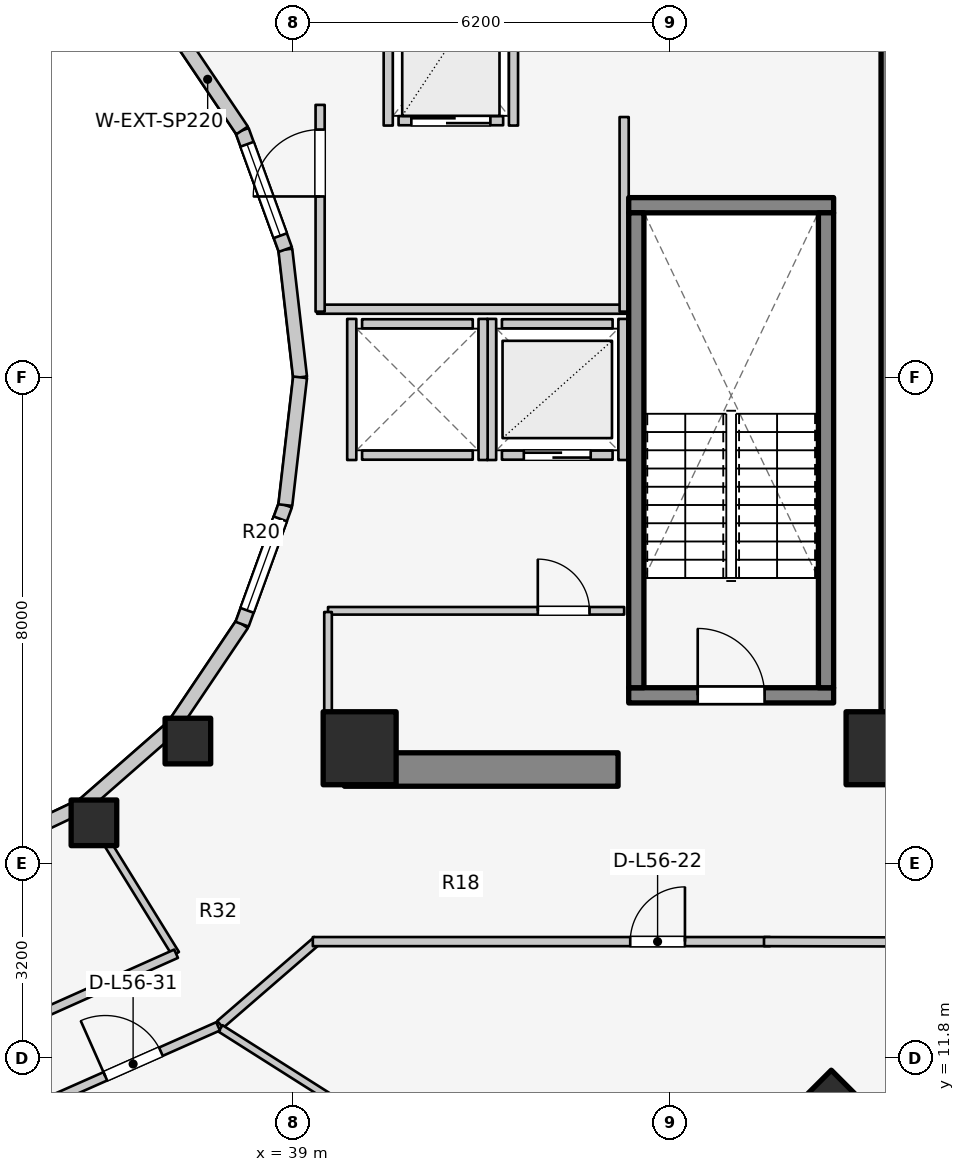
"""IFC4 building model, lengths in metres.
Left out: names, types, materials, properties, quantities, classifications, styles, units other than length and angle.
Written with IfcOpenShell. Run it as: python <this file> out.ifc"""

import sys

from ifc_helpers import new_model, si_unit, direction, frame, frame_2d, origin, origin_2d, place, context, subcontext, project, spatial, rectangle, extrude, element, fill, save


model = new_model("IFC4")
c1 = context("Model", 3, precision=1e-05, world=origin(), true_north=direction((0.0, 1.0)))
c2 = subcontext(c1, "Body", "Model", "MODEL_VIEW")
j1 = project(units=[si_unit("LENGTHUNIT", "METRE"), si_unit("PLANEANGLEUNIT", "RADIAN")], contexts=[c1])
p1 = place(None, origin())
s1 = spatial("IfcSite", under=j1, at=p1, CompositionType="ELEMENT")
p2 = place(p1, origin())
s2 = spatial("IfcBuilding", under=s1, at=p2, CompositionType="ELEMENT")
p3 = place(p2, frame((0.0, 0.0, 183.9)))
s3 = spatial("IfcBuildingStorey", under=s2, at=p3, CompositionType="ELEMENT", Elevation=183.9)
p4 = place(p3, frame((48.95, 17.05, 0.0), z_axis=(0.0, 0.0, 1.0), x_axis=(0.0, 1.0, 0.0)))
e1 = element("IfcWall", 1, at=p4, inside=s3, PredefinedType="SHEAR", context=c2, shape_type="SweptSolid", body=[
    extrude(rectangle(XDim=12.8, YDim=0.55, at=frame_2d((6.4, 0.0))), origin(), (0.0, 0.0, 1.0), 3.1),
])
p5 = place(p3, frame((39.85, 16.55, 0.0), z_axis=(0.0, 0.0, 1.0), x_axis=(1.0, 0.0, 0.0)))
e2 = element("IfcWall", 2, at=p5, inside=s3, PredefinedType="SHEAR", context=c2, shape_type="SweptSolid", body=[
    extrude(rectangle(XDim=4.5, YDim=0.55, at=frame_2d((2.25, 0.0))), origin(), (0.0, 0.0, 1.0), 3.1),
])
p6 = place(p3, frame((44.525, 17.77, 0.0), z_axis=(0.0, 0.0, 1.0), x_axis=(1.0, 0.0, 0.0)))
e3 = element("IfcWall", 3, at=p6, inside=s3, PredefinedType="SOLIDWALL", context=c2, shape_type="SweptSolid", body=[
    extrude(rectangle(XDim=3.37, YDim=0.25, at=frame_2d((1.685, 0.0))), origin(), (0.0, 0.0, 1.0), 3.1),
])
p7 = place(p6, frame((1.135, 0.0, 0.0)))
e4 = element("IfcOpeningElement", 4, at=p7, cuts=e3, PredefinedType="OPENING", context=c2, shape_type="SweptSolid", body=[
    extrude(rectangle(XDim=1.1, YDim=2.1, at=frame_2d((0.55, 1.05))), frame((0.0, 0.135, 0.0), z_axis=(0.0, -1.0, 0.0), x_axis=(1.0, 0.0, 0.0)), (0.0, 0.0, 1.0), 0.27),
])
p8 = place(p3, frame((44.525, 25.83, 0.0), z_axis=(0.0, 0.0, 1.0), x_axis=(1.0, 0.0, 0.0)))
e5 = element("IfcWall", 5, at=p8, inside=s3, PredefinedType="SOLIDWALL", context=c2, shape_type="SweptSolid", body=[
    extrude(rectangle(XDim=3.37, YDim=0.25, at=frame_2d((1.685, 0.0))), origin(), (0.0, 0.0, 1.0), 3.1),
])
for number, where, z_axis, x_axis in (
    (6, (44.65, 17.895, 0.0), (0.0, 0.0, 1.0), (0.0, 1.0, 0.0)),
    (7, (47.77, 17.895, 0.0), (0.0, 0.0, 1.0), (0.0, 1.0, 0.0)),
):
    element("IfcWall", number, at=place(p3, frame(where, z_axis=z_axis, x_axis=x_axis)), inside=s3, PredefinedType="SOLIDWALL", context=c2, shape_type="SweptSolid", body=[
        extrude(rectangle(XDim=7.81, YDim=0.25, at=frame_2d((3.905, 0.0))), origin(), (0.0, 0.0, 1.0), 3.1),
    ])
for number, where, z_axis, x_axis in (
    (8, (40.1, 16.9, 0.0), (0.0, 0.0, 1.0), (1.0, 0.0, 0.0)),
    (9, (48.7, 16.9, 0.0), (0.0, 0.0, 1.0), (1.0, 0.0, 0.0)),
):
    element("IfcColumn", number, at=place(p3, frame(where, z_axis=z_axis, x_axis=x_axis)), inside=s3, PredefinedType="COLUMN", context=c2, shape_type="SweptSolid", body=[
        extrude(rectangle(XDim=1.2, YDim=1.2, at=origin_2d()), origin(), (0.0, 0.0, 1.0), 3.1),
    ])
for number, where, z_axis, x_axis in (
    (10, (35.73, 15.673, 0.0), (0.0, 0.0, 1.0), (1.0, 0.0, 0.0)),
    (11, (37.275, 17.018, 0.0), (0.0, 0.0, 1.0), (1.0, 0.0, 0.0)),
):
    element("IfcColumn", number, at=place(p3, frame(where, z_axis=z_axis, x_axis=x_axis)), inside=s3, PredefinedType="COLUMN", context=c2, shape_type="SweptSolid", body=[
        extrude(rectangle(XDim=0.75, YDim=0.75, at=origin_2d()), origin(), (0.0, 0.0, 1.0), 3.1),
    ])
p9 = place(p3, frame((47.857, 10.969, 0.0), z_axis=(0.0, 0.0, 1.0), x_axis=(0.707106781187, -0.707106781187, 0.0)))
e12 = element("IfcColumn", 12, at=p9, inside=s3, PredefinedType="COLUMN", context=c2, shape_type="SweptSolid", body=[
    extrude(rectangle(XDim=0.9, YDim=0.9, at=origin_2d()), origin(), (0.0, 0.0, 1.0), 3.1),
])
p10 = place(p3, frame((39.12, 23.0, 0.0), z_axis=(0.0, 0.0, 1.0), x_axis=(-0.114711713601, 0.993398823617, 0.0)))
e13 = element("IfcWall", 13, at=p10, inside=s3, PredefinedType="STANDARD", context=c2, shape_type="SweptSolid", body=[
    extrude(rectangle(XDim=2.115, YDim=0.23, at=frame_2d((1.058, 0.0))), origin(), (0.0, 0.0, 1.0), 2.84),
])
p11 = place(p3, frame((38.877, 25.102, 0.0), z_axis=(0.0, 0.0, 1.0), x_axis=(-0.341423187295, 0.93990968033, 0.0)))
e14 = element("IfcWall", 14, at=p11, inside=s3, PredefinedType="STANDARD", context=c2, shape_type="SweptSolid", body=[
    extrude(rectangle(XDim=2.084, YDim=0.23, at=frame_2d((1.042, 0.0))), origin(), (0.0, 0.0, 1.0), 2.84),
])
p12 = place(p11, frame((0.242, 0.0, 0.85)))
e15 = element("IfcOpeningElement", 15, at=p12, cuts=e14, PredefinedType="OPENING", context=c2, shape_type="SweptSolid", body=[
    extrude(rectangle(XDim=1.6, YDim=1.65, at=frame_2d((0.8, 0.825))), frame((0.0, 0.125, 0.0), z_axis=(0.0, -1.0, 0.0), x_axis=(1.0, 0.0, 0.0)), (0.0, 0.0, 1.0), 0.25),
])
p13 = place(p3, frame((38.166, 27.06, 0.0), z_axis=(0.0, 0.0, 1.0), x_axis=(-0.558197800898, 0.829707909492, 0.0)))
e16 = element("IfcWall", 16, at=p13, inside=s3, PredefinedType="STANDARD", context=c2, shape_type="SweptSolid", body=[
    extrude(rectangle(XDim=2.027, YDim=0.23, at=frame_2d((1.013, 0.0))), origin(), (0.0, 0.0, 1.0), 2.16),
])
p14 = place(p3, frame((33.843, 15.157, 0.0), z_axis=(0.0, 0.0, 1.0), x_axis=(0.904179699603, 0.427152280606, 0.0)))
e17 = element("IfcWall", 17, at=p14, inside=s3, PredefinedType="STANDARD", context=c2, shape_type="SweptSolid", body=[
    extrude(rectangle(XDim=1.899, YDim=0.23, at=frame_2d((0.95, 0.0))), origin(), (0.0, 0.0, 1.0), 2.16),
])
p15 = place(p3, frame((35.56, 15.968, 0.0), z_axis=(0.0, 0.0, 1.0), x_axis=(0.752576694707, 0.658504607869, 0.0)))
e18 = element("IfcWall", 18, at=p15, inside=s3, PredefinedType="STANDARD", context=c2, shape_type="SweptSolid", body=[
    extrude(rectangle(XDim=1.959, YDim=0.23, at=frame_2d((0.98, 0.0))), origin(), (0.0, 0.0, 1.0), 2.16),
])
p16 = place(p3, frame((37.035, 17.258, 0.0), z_axis=(0.0, 0.0, 1.0), x_axis=(0.558197800898, 0.829707909492, 0.0)))
e19 = element("IfcWall", 19, at=p16, inside=s3, PredefinedType="STANDARD", context=c2, shape_type="SweptSolid", body=[
    extrude(rectangle(XDim=2.027, YDim=0.23, at=frame_2d((1.013, 0.0))), origin(), (0.0, 0.0, 1.0), 2.16),
])
p17 = place(p3, frame((38.166, 18.94, 0.0), z_axis=(0.0, 0.0, 1.0), x_axis=(0.341423187295, 0.93990968033, 0.0)))
e20 = element("IfcWall", 20, at=p17, inside=s3, PredefinedType="STANDARD", context=c2, shape_type="SweptSolid", body=[
    extrude(rectangle(XDim=2.084, YDim=0.23, at=frame_2d((1.042, 0.0))), origin(), (0.0, 0.0, 1.0), 2.84),
])
p18 = place(p17, frame((0.242, 0.0, 0.85)))
e21 = element("IfcOpeningElement", 21, at=p18, cuts=e20, PredefinedType="OPENING", context=c2, shape_type="SweptSolid", body=[
    extrude(rectangle(XDim=1.6, YDim=1.65, at=frame_2d((0.8, 0.825))), frame((0.0, 0.125, 0.0), z_axis=(0.0, -1.0, 0.0), x_axis=(1.0, 0.0, 0.0)), (0.0, 0.0, 1.0), 0.25),
])
p19 = place(p3, frame((38.877, 20.898, 0.0), z_axis=(0.0, 0.0, 1.0), x_axis=(0.114711713601, 0.993398823617, 0.0)))
e22 = element("IfcWall", 22, at=p19, inside=s3, PredefinedType="STANDARD", context=c2, shape_type="SweptSolid", body=[
    extrude(rectangle(XDim=2.115, YDim=0.23, at=frame_2d((1.058, 0.0))), origin(), (0.0, 0.0, 1.0), 2.84),
])
p20 = place(p3, frame((48.269, 10.559, 0.0), z_axis=(0.0, 0.0, 1.0), x_axis=(0.727667301037, 0.68593024354, 0.0)))
e23 = element("IfcWall", 23, at=p20, inside=s3, PredefinedType="STANDARD", context=c2, shape_type="SweptSolid", body=[
    extrude(rectangle(XDim=4.604, YDim=0.26, at=frame_2d((2.302, 0.0))), origin(), (0.0, 0.0, 1.0), 2.85),
])
p21 = place(p20, frame((1.552, 0.0, 0.75)))
e24 = element("IfcOpeningElement", 24, at=p21, cuts=e23, PredefinedType="OPENING", context=c2, shape_type="SweptSolid", body=[
    extrude(rectangle(XDim=1.5, YDim=1.6, at=frame_2d((0.75, 0.8))), frame((0.0, 0.14, 0.0), z_axis=(0.0, -1.0, 0.0), x_axis=(1.0, 0.0, 0.0)), (0.0, 0.0, 1.0), 0.28),
])
p22 = place(p3, frame((42.44, 21.72, 0.0), z_axis=(0.0, 0.0, 1.0), x_axis=(1.0, 0.0, 0.0)))
e25 = element("IfcWall", 25, at=p22, inside=s3, PredefinedType="SOLIDWALL", context=c2, shape_type="SweptSolid", body=[
    extrude(rectangle(XDim=1.82, YDim=0.15, at=frame_2d((0.91, 0.0))), origin(), (0.0, 0.0, 1.0), 2.855),
])
p23 = place(p22, frame((0.36, 0.0, 0.0)))
e26 = element("IfcOpeningElement", 26, at=p23, cuts=e25, PredefinedType="OPENING", context=c2, shape_type="SweptSolid", body=[
    extrude(rectangle(XDim=1.1, YDim=2.1, at=frame_2d((0.55, 1.05))), frame((0.0, 0.085, 0.0), z_axis=(0.0, -1.0, 0.0), x_axis=(1.0, 0.0, 0.0)), (0.0, 0.0, 1.0), 0.17),
])
p24 = place(p3, frame((42.44, 23.88, 0.0), z_axis=(0.0, 0.0, 1.0), x_axis=(1.0, 0.0, 0.0)))
e27 = element("IfcWall", 27, at=p24, inside=s3, PredefinedType="SOLIDWALL", context=c2, shape_type="SweptSolid", body=[
    extrude(rectangle(XDim=1.82, YDim=0.15, at=frame_2d((0.91, 0.0))), origin(), (0.0, 0.0, 1.0), 2.855),
])
for number, where, z_axis, x_axis in (
    (28, (42.27, 21.64, 0.0), (0.0, 0.0, 1.0), (0.0, 1.0, 0.0)),
    (29, (44.43, 21.64, 0.0), (0.0, 0.0, 1.0), (0.0, 1.0, 0.0)),
):
    element("IfcWall", number, at=place(p3, frame(where, z_axis=z_axis, x_axis=x_axis)), inside=s3, PredefinedType="SOLIDWALL", context=c2, shape_type="SweptSolid", body=[
        extrude(rectangle(XDim=2.32, YDim=0.15, at=frame_2d((1.16, 0.0))), origin(), (0.0, 0.0, 1.0), 2.855),
    ])
for number, where, z_axis, x_axis in (
    (30, (40.14, 21.72, 0.0), (0.0, 0.0, 1.0), (1.0, 0.0, 0.0)),
    (31, (40.14, 23.88, 0.0), (0.0, 0.0, 1.0), (1.0, 0.0, 0.0)),
):
    element("IfcWall", number, at=place(p3, frame(where, z_axis=z_axis, x_axis=x_axis)), inside=s3, PredefinedType="SOLIDWALL", context=c2, shape_type="SweptSolid", body=[
        extrude(rectangle(XDim=1.82, YDim=0.15, at=frame_2d((0.91, 0.0))), origin(), (0.0, 0.0, 1.0), 2.12),
    ])
p25 = place(p3, frame((39.97, 21.64, 0.0), z_axis=(0.0, 0.0, 1.0), x_axis=(0.0, 1.0, 0.0)))
e32 = element("IfcWall", 32, at=p25, inside=s3, PredefinedType="SOLIDWALL", context=c2, shape_type="SweptSolid", body=[
    extrude(rectangle(XDim=2.32, YDim=0.15, at=frame_2d((1.16, 0.0))), origin(), (0.0, 0.0, 1.0), 2.12),
])
p26 = place(p3, frame((42.13, 21.64, 0.0), z_axis=(0.0, 0.0, 1.0), x_axis=(0.0, 1.0, 0.0)))
e33 = element("IfcWall", 33, at=p26, inside=s3, PredefinedType="SOLIDWALL", context=c2, shape_type="SweptSolid", body=[
    extrude(rectangle(XDim=2.32, YDim=0.15, at=frame_2d((1.16, 0.0))), origin(), (0.0, 0.0, 1.0), 2.855),
])
p27 = place(p3, frame((40.74, 27.22, 0.0), z_axis=(0.0, 0.0, 1.0), x_axis=(1.0, 0.0, 0.0)))
e34 = element("IfcWall", 34, at=p27, inside=s3, PredefinedType="SOLIDWALL", context=c2, shape_type="SweptSolid", body=[
    extrude(rectangle(XDim=1.72, YDim=0.15, at=frame_2d((0.86, 0.0))), origin(), (0.0, 0.0, 1.0), 2.855),
])
p28 = place(p27, frame((0.21, 0.0, 0.0)))
e35 = element("IfcOpeningElement", 35, at=p28, cuts=e34, PredefinedType="OPENING", context=c2, shape_type="SweptSolid", body=[
    extrude(rectangle(XDim=1.3, YDim=2.1, at=frame_2d((0.65, 1.05))), frame((0.0, 0.085, 0.0), z_axis=(0.0, -1.0, 0.0), x_axis=(1.0, 0.0, 0.0)), (0.0, 0.0, 1.0), 0.17),
])
for number, where, z_axis, x_axis in (
    (36, (40.57, 27.14, 0.0), (0.0, 0.0, 1.0), (0.0, 1.0, 0.0)),
    (37, (42.63, 27.14, 0.0), (0.0, 0.0, 1.0), (0.0, 1.0, 0.0)),
):
    element("IfcWall", number, at=place(p3, frame(where, z_axis=z_axis, x_axis=x_axis)), inside=s3, PredefinedType="SOLIDWALL", context=c2, shape_type="SweptSolid", body=[
        extrude(rectangle(XDim=2.72, YDim=0.15, at=frame_2d((1.36, 0.0))), origin(), (0.0, 0.0, 1.0), 2.855),
    ])
p29 = place(p3, frame((39.4, 24.12, 0.0), z_axis=(0.0, 0.0, 1.0), x_axis=(1.0, 0.0, 0.0)))
e38 = element("IfcWall", 38, at=p29, inside=s3, PredefinedType="PARTITIONING", context=c2, shape_type="SweptSolid", body=[
    extrude(rectangle(XDim=5.08, YDim=0.15, at=frame_2d((2.54, 0.0))), origin(), (0.0, 0.0, 1.0), 2.12),
])
p30 = place(p3, frame((44.45, 24.08, 0.0), z_axis=(0.0, 0.0, 1.0), x_axis=(0.0, 1.0, 0.0)))
e39 = element("IfcWall", 39, at=p30, inside=s3, PredefinedType="PARTITIONING", context=c2, shape_type="SweptSolid", body=[
    extrude(rectangle(XDim=3.2, YDim=0.15, at=frame_2d((1.6, 0.0))), origin(), (0.0, 0.0, 1.0), 2.855),
])
p31 = place(p3, frame((39.45, 24.08, 0.0), z_axis=(0.0, 0.0, 1.0), x_axis=(0.0, 1.0, 0.0)))
e40 = element("IfcWall", 40, at=p31, inside=s3, PredefinedType="PARTITIONING", context=c2, shape_type="SweptSolid", body=[
    extrude(rectangle(XDim=3.4, YDim=0.15, at=frame_2d((1.7, 0.0))), origin(), (0.0, 0.0, 1.0), 2.855),
])
p32 = place(p31, frame((1.894, 0.0, 0.0)))
e41 = element("IfcOpeningElement", 41, at=p32, cuts=e40, PredefinedType="OPENING", context=c2, shape_type="SweptSolid", body=[
    extrude(rectangle(XDim=1.1, YDim=2.1, at=frame_2d((0.55, 1.05))), frame((0.0, 0.085, 0.0), z_axis=(0.0, -1.0, 0.0), x_axis=(1.0, 0.0, 0.0)), (0.0, 0.0, 1.0), 0.17),
])
p33 = place(p3, frame((39.58, 19.16, 0.0), z_axis=(0.0, 0.0, 1.0), x_axis=(1.0, 0.0, 0.0)))
e42 = element("IfcWall", 42, at=p33, inside=s3, PredefinedType="PARTITIONING", context=c2, shape_type="SweptSolid", body=[
    extrude(rectangle(XDim=4.87, YDim=0.125, at=frame_2d((2.435, 0.0))), origin(), (0.0, 0.0, 1.0), 2.12),
])
p34 = place(p33, frame((3.45, 0.0, 0.0)))
e43 = element("IfcOpeningElement", 43, at=p34, cuts=e42, PredefinedType="OPENING", context=c2, shape_type="SweptSolid", body=[
    extrude(rectangle(XDim=0.85, YDim=2.05, at=frame_2d((0.425, 1.025))), frame((0.0, 0.073, 0.0), z_axis=(0.0, -1.0, 0.0), x_axis=(1.0, 0.0, 0.0)), (0.0, 0.0, 1.0), 0.145),
])
p35 = place(p3, frame((39.58, 17.1, 0.0), z_axis=(0.0, 0.0, 1.0), x_axis=(0.0, 1.0, 0.0)))
e44 = element("IfcWall", 44, at=p35, inside=s3, PredefinedType="PARTITIONING", context=c2, shape_type="SweptSolid", body=[
    extrude(rectangle(XDim=2.04, YDim=0.125, at=frame_2d((1.02, 0.0))), origin(), (0.0, 0.0, 1.0), 2.232),
])
p36 = place(p3, frame((37.807, 12.358, 0.0), z_axis=(0.0, 0.0, 1.0), x_axis=(0.756055312247, 0.654507727092, 0.0)))
e45 = element("IfcWall", 45, at=p36, inside=s3, PredefinedType="PARTITIONING", context=c2, shape_type="SweptSolid", body=[
    extrude(rectangle(XDim=2.111, YDim=0.15, at=frame_2d((1.055, 0.0))), origin(), (0.0, 0.0, 1.0), 2.299),
])
p37 = place(p3, frame((39.33, 13.72, 0.0), z_axis=(0.0, 0.0, 1.0), x_axis=(1.0, 0.0, 0.0)))
e46 = element("IfcWall", 46, at=p37, inside=s3, PredefinedType="PARTITIONING", context=c2, shape_type="SweptSolid", body=[
    extrude(rectangle(XDim=7.52, YDim=0.15, at=frame_2d((3.76, 0.0))), origin(), (0.0, 0.0, 1.0), 2.299),
])
p38 = place(p37, frame((5.22, 0.0, 0.0)))
e47 = element("IfcOpeningElement", 47, at=p38, cuts=e46, PredefinedType="OPENING", context=c2, shape_type="SweptSolid", body=[
    extrude(rectangle(XDim=0.9, YDim=2.1, at=frame_2d((0.45, 1.05))), frame((0.0, 0.085, 0.0), z_axis=(0.0, -1.0, 0.0), x_axis=(1.0, 0.0, 0.0)), (0.0, 0.0, 1.0), 0.17),
])
p39 = place(p3, frame((46.75, 13.72, 0.0), z_axis=(0.0, 0.0, 1.0), x_axis=(0.999997122315, -0.00239903348, 0.0)))
e48 = element("IfcWall", 48, at=p39, inside=s3, PredefinedType="PARTITIONING", context=c2, shape_type="SweptSolid", body=[
    extrude(rectangle(XDim=4.885, YDim=0.15, at=frame_2d((2.442, 0.0))), origin(), (0.0, 0.0, 1.0), 2.22),
])
p40 = place(p3, frame((35.55, 15.985, 0.0), z_axis=(0.0, 0.0, 1.0), x_axis=(0.525627246902, -0.850714991824, 0.0)))
e49 = element("IfcWall", 49, at=p40, inside=s3, PredefinedType="PARTITIONING", context=c2, shape_type="SweptSolid", body=[
    extrude(rectangle(XDim=2.901, YDim=0.125, at=frame_2d((1.451, 0.0))), origin(), (0.0, 0.0, 1.0), 2.299),
])
p41 = place(p3, frame((34.625, 12.423, 0.0), z_axis=(0.0, 0.0, 1.0), x_axis=(0.912888568324, 0.408208845842, 0.0)))
e50 = element("IfcWall", 50, at=p41, inside=s3, PredefinedType="PARTITIONING", context=c2, shape_type="SweptSolid", body=[
    extrude(rectangle(XDim=2.69, YDim=0.15, at=frame_2d((1.345, 0.0))), origin(), (0.0, 0.0, 1.0), 2.299),
])
p42 = place(p3, frame((37.812, 12.292, 0.0), z_axis=(0.0, 0.0, 1.0), x_axis=(0.844640430122, -0.535334048799, 0.0)))
e51 = element("IfcWall", 51, at=p42, inside=s3, PredefinedType="PARTITIONING", context=c2, shape_type="SweptSolid", body=[
    extrude(rectangle(XDim=7.188, YDim=0.125, at=frame_2d((3.594, 0.0))), origin(), (0.0, 0.0, 1.0), 2.299),
])
p43 = place(p3, frame((34.976, 11.088, 0.0), z_axis=(0.0, 0.0, 1.0), x_axis=(0.914324470734, 0.404982422108, 0.0)))
e52 = element("IfcWall", 52, at=p43, inside=s3, PredefinedType="PARTITIONING", context=c2, shape_type="SweptSolid", body=[
    extrude(rectangle(XDim=3.058, YDim=0.15, at=frame_2d((1.529, 0.0))), origin(), (0.0, 0.0, 1.0), 2.299),
])
p44 = place(p43, frame((1.029, 0.0, 0.0)))
e53 = element("IfcOpeningElement", 53, at=p44, cuts=e52, PredefinedType="OPENING", context=c2, shape_type="SweptSolid", body=[
    extrude(rectangle(XDim=1.0, YDim=2.1, at=frame_2d((0.5, 1.05))), frame((0.0, 0.085, 0.0), z_axis=(0.0, -1.0, 0.0), x_axis=(1.0, 0.0, 0.0)), (0.0, 0.0, 1.0), 0.17),
])
p45 = place(p12, origin())
e54 = element("IfcWindow", 54, at=p45, inside=s3, PartitioningType="SINGLE_PANEL", PredefinedType="WINDOW", context=c2, shape_type="SweptSolid", body=[
    extrude(rectangle(XDim=1.6, YDim=1.65, at=frame_2d((0.8, 0.825))), frame((0.0, 0.03, 0.0), z_axis=(0.0, -1.0, 0.0), x_axis=(1.0, 0.0, 0.0)), (0.0, 0.0, 1.0), 0.06),
])
fill(e15, e54)
p46 = place(p18, origin())
e55 = element("IfcWindow", 55, at=p46, inside=s3, PartitioningType="SINGLE_PANEL", PredefinedType="WINDOW", context=c2, shape_type="SweptSolid", body=[
    extrude(rectangle(XDim=1.6, YDim=1.65, at=frame_2d((0.8, 0.825))), frame((0.0, 0.03, 0.0), z_axis=(0.0, -1.0, 0.0), x_axis=(1.0, 0.0, 0.0)), (0.0, 0.0, 1.0), 0.06),
])
fill(e21, e55)
p47 = place(p7, origin())
e56 = element("IfcDoor", 56, at=p47, inside=s3, OperationType="SINGLE_SWING_LEFT", PredefinedType="DOOR", context=c2, shape_type="SweptSolid", body=[
    extrude(rectangle(XDim=1.1, YDim=2.1, at=frame_2d((0.55, 1.05))), frame((0.0, 0.025, 0.0), z_axis=(0.0, -1.0, 0.0), x_axis=(1.0, 0.0, 0.0)), (0.0, 0.0, 1.0), 0.05),
])
fill(e4, e56)
p48 = place(p23, origin())
e57 = element("IfcDoor", 57, at=p48, inside=s3, OperationType="DOUBLE_DOOR_SLIDING", PredefinedType="DOOR", context=c2, shape_type="SweptSolid", body=[
    extrude(rectangle(XDim=1.1, YDim=2.1, at=frame_2d((0.55, 1.05))), frame((0.0, 0.025, 0.0), z_axis=(0.0, -1.0, 0.0), x_axis=(1.0, 0.0, 0.0)), (0.0, 0.0, 1.0), 0.05),
])
fill(e26, e57)
p49 = place(p28, origin())
e58 = element("IfcDoor", 58, at=p49, inside=s3, OperationType="DOUBLE_DOOR_SLIDING", PredefinedType="DOOR", context=c2, shape_type="SweptSolid", body=[
    extrude(rectangle(XDim=1.3, YDim=2.1, at=frame_2d((0.65, 1.05))), frame((0.0, 0.025, 0.0), z_axis=(0.0, -1.0, 0.0), x_axis=(1.0, 0.0, 0.0)), (0.0, 0.0, 1.0), 0.05),
])
fill(e35, e58)
p50 = place(p32, origin())
e59 = element("IfcDoor", 59, at=p50, inside=s3, OperationType="SINGLE_SWING_LEFT", PredefinedType="DOOR", context=c2, shape_type="SweptSolid", body=[
    extrude(rectangle(XDim=1.1, YDim=2.1, at=frame_2d((0.55, 1.05))), frame((0.0, 0.025, 0.0), z_axis=(0.0, -1.0, 0.0), x_axis=(1.0, 0.0, 0.0)), (0.0, 0.0, 1.0), 0.05),
])
fill(e41, e59)
p51 = place(p34, origin())
e60 = element("IfcDoor", 60, at=p51, inside=s3, OperationType="SINGLE_SWING_LEFT", PredefinedType="DOOR", context=c2, shape_type="SweptSolid", body=[
    extrude(rectangle(XDim=0.85, YDim=2.05, at=frame_2d((0.425, 1.025))), frame((0.0, 0.025, 0.0), z_axis=(0.0, -1.0, 0.0), x_axis=(1.0, 0.0, 0.0)), (0.0, 0.0, 1.0), 0.05),
])
fill(e43, e60)
p52 = place(p38, origin())
e61 = element("IfcDoor", 61, at=p52, inside=s3, OperationType="SINGLE_SWING_RIGHT", PredefinedType="DOOR", context=c2, shape_type="SweptSolid", body=[
    extrude(rectangle(XDim=0.9, YDim=2.1, at=frame_2d((0.45, 1.05))), frame((0.0, 0.025, 0.0), z_axis=(0.0, -1.0, 0.0), x_axis=(1.0, 0.0, 0.0)), (0.0, 0.0, 1.0), 0.05),
])
fill(e47, e61)
p53 = place(p44, origin())
e62 = element("IfcDoor", 62, at=p53, inside=s3, OperationType="SINGLE_SWING_LEFT", PredefinedType="DOOR", context=c2, shape_type="SweptSolid", body=[
    extrude(rectangle(XDim=1.0, YDim=2.1, at=frame_2d((0.5, 1.05))), frame((0.0, 0.025, 0.0), z_axis=(0.0, -1.0, 0.0), x_axis=(1.0, 0.0, 0.0)), (0.0, 0.0, 1.0), 0.05),
])
fill(e53, e62)
save(model, sys.argv[1])
